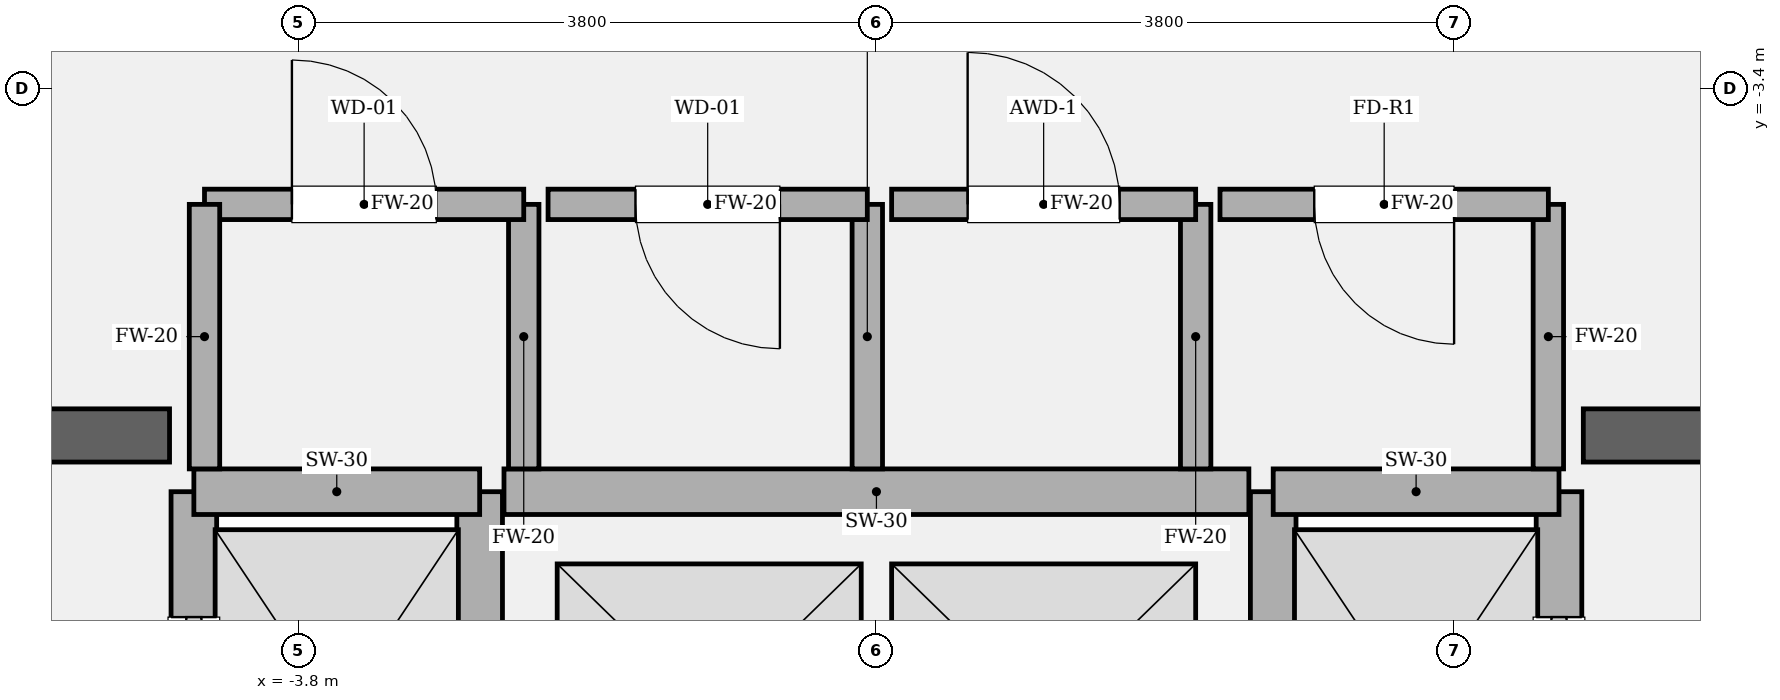
"""IFC4 building model, lengths in metres.
Left out: names, types, materials, properties, quantities, classifications, styles, units other than length and angle.
Written with IfcOpenShell. Run it as: python <this file> out.ifc"""

import sys

from ifc_helpers import new_model, si_unit, direction, frame, frame_2d, origin, place, context, subcontext, project, spatial, rectangle, extrude, element, fill, save


model = new_model("IFC4")
c1 = context("Model", 3, precision=1e-05, world=origin(), true_north=direction((0.0, 1.0)))
c2 = subcontext(c1, "Body", "Model", "MODEL_VIEW")
j1 = project(units=[si_unit("LENGTHUNIT", "METRE"), si_unit("PLANEANGLEUNIT", "RADIAN")], contexts=[c1])
p1 = place(None, origin())
s1 = spatial("IfcSite", under=j1, at=p1, CompositionType="ELEMENT")
p2 = place(p1, origin())
s2 = spatial("IfcBuilding", under=s1, at=p2, CompositionType="ELEMENT")
p3 = place(p2, frame((0.0, 0.0, -4.8)))
s3 = spatial("IfcBuildingStorey", under=s2, at=p3, CompositionType="ELEMENT", Elevation=-4.8)
p4 = place(p3, frame((-9.825, -5.68, 0.0), z_axis=(0.0, 0.0, 1.0), x_axis=(1.0, 0.0, 0.0)))
e1 = element("IfcWall", 1, at=p4, inside=s3, PredefinedType="SOLIDWALL", context=c2, shape_type="SweptSolid", body=[
    extrude(rectangle(XDim=5.175, YDim=0.35, at=frame_2d((2.587, 0.0))), origin(), (0.0, 0.0, 1.0), 4.8),
])
p5 = place(p4, frame((1.285, 0.0, 0.0)))
e2 = element("IfcOpeningElement", 2, at=p5, cuts=e1, PredefinedType="OPENING", context=c2, shape_type="SweptSolid", body=[
    extrude(rectangle(XDim=1.18, YDim=2.2, at=frame_2d((0.59, 1.1))), frame((0.0, 0.185, 0.0), z_axis=(0.0, -1.0, 0.0), x_axis=(1.0, 0.0, 0.0)), (0.0, 0.0, 1.0), 0.37),
])
p6 = place(p3, frame((4.65, -5.68, 0.0), z_axis=(0.0, 0.0, 1.0), x_axis=(1.0, 0.0, 0.0)))
e3 = element("IfcWall", 3, at=p6, inside=s3, PredefinedType="SOLIDWALL", context=c2, shape_type="SweptSolid", body=[
    extrude(rectangle(XDim=5.175, YDim=0.35, at=frame_2d((2.587, 0.0))), origin(), (0.0, 0.0, 1.0), 4.8),
])
p7 = place(p6, frame((2.71, 0.0, 0.0)))
e4 = element("IfcOpeningElement", 4, at=p7, cuts=e3, PredefinedType="OPENING", context=c2, shape_type="SweptSolid", body=[
    extrude(rectangle(XDim=1.18, YDim=2.2, at=frame_2d((0.59, 1.1))), frame((0.0, 0.185, 0.0), z_axis=(0.0, -1.0, 0.0), x_axis=(1.0, 0.0, 0.0)), (0.0, 0.0, 1.0), 0.37),
])
p8 = place(p3, frame((-4.49, -8.82, 0.0), z_axis=(0.0, 0.0, 1.0), x_axis=(0.0, 1.0, 0.0)))
e5 = element("IfcWall", 5, at=p8, inside=s3, PredefinedType="SOLIDWALL", context=c2, shape_type="SweptSolid", body=[
    extrude(rectangle(XDim=2.77, YDim=0.3, at=frame_2d((1.385, 0.0))), origin(), (0.0, 0.0, 1.0), 4.52),
])
p9 = place(p8, frame((0.825, 0.0, 0.0)))
e6 = element("IfcOpeningElement", 6, at=p9, cuts=e5, PredefinedType="OPENING", context=c2, shape_type="SweptSolid", body=[
    extrude(rectangle(XDim=1.12, YDim=2.25, at=frame_2d((0.56, 1.125))), frame((0.0, 0.16, 0.0), z_axis=(0.0, -1.0, 0.0), x_axis=(1.0, 0.0, 0.0)), (0.0, 0.0, 1.0), 0.32),
])
p10 = place(p3, frame((-2.61, -8.82, 0.0), z_axis=(0.0, 0.0, 1.0), x_axis=(0.0, 1.0, 0.0)))
e7 = element("IfcWall", 7, at=p10, inside=s3, PredefinedType="SOLIDWALL", context=c2, shape_type="SweptSolid", body=[
    extrude(rectangle(XDim=2.77, YDim=0.3, at=frame_2d((1.385, 0.0))), origin(), (0.0, 0.0, 1.0), 4.52),
])
p11 = place(p3, frame((-4.49, -6.05, 0.0), z_axis=(0.0, 0.0, 1.0), x_axis=(1.0, 0.0, 0.0)))
e8 = element("IfcWall", 8, at=p11, inside=s3, PredefinedType="SOLIDWALL", context=c2, shape_type="SweptSolid", body=[
    extrude(rectangle(XDim=1.88, YDim=0.3, at=frame_2d((0.94, 0.0))), origin(), (0.0, 0.0, 1.0), 4.52),
])
p12 = place(p3, frame((4.49, -8.82, 0.0), z_axis=(0.0, 0.0, 1.0), x_axis=(0.0, 1.0, 0.0)))
e9 = element("IfcWall", 9, at=p12, inside=s3, PredefinedType="SOLIDWALL", context=c2, shape_type="SweptSolid", body=[
    extrude(rectangle(XDim=2.77, YDim=0.3, at=frame_2d((1.385, 0.0))), origin(), (0.0, 0.0, 1.0), 4.52),
])
p13 = place(p12, frame((0.825, 0.0, 0.0)))
e10 = element("IfcOpeningElement", 10, at=p13, cuts=e9, PredefinedType="OPENING", context=c2, shape_type="SweptSolid", body=[
    extrude(rectangle(XDim=1.12, YDim=2.25, at=frame_2d((0.56, 1.125))), frame((0.0, 0.16, 0.0), z_axis=(0.0, -1.0, 0.0), x_axis=(1.0, 0.0, 0.0)), (0.0, 0.0, 1.0), 0.32),
])
p14 = place(p3, frame((2.61, -8.82, 0.0), z_axis=(0.0, 0.0, 1.0), x_axis=(0.0, 1.0, 0.0)))
e11 = element("IfcWall", 11, at=p14, inside=s3, PredefinedType="SOLIDWALL", context=c2, shape_type="SweptSolid", body=[
    extrude(rectangle(XDim=2.77, YDim=0.3, at=frame_2d((1.385, 0.0))), origin(), (0.0, 0.0, 1.0), 4.52),
])
p15 = place(p3, frame((2.61, -6.05, 0.0), z_axis=(0.0, 0.0, 1.0), x_axis=(1.0, 0.0, 0.0)))
e12 = element("IfcWall", 12, at=p15, inside=s3, PredefinedType="SOLIDWALL", context=c2, shape_type="SweptSolid", body=[
    extrude(rectangle(XDim=1.88, YDim=0.3, at=frame_2d((0.94, 0.0))), origin(), (0.0, 0.0, 1.0), 4.52),
])
p16 = place(p3, frame((-2.45, -6.05, 0.0), z_axis=(0.0, 0.0, 1.0), x_axis=(1.0, 0.0, 0.0)))
e13 = element("IfcWall", 13, at=p16, inside=s3, PredefinedType="SOLIDWALL", context=c2, shape_type="SweptSolid", body=[
    extrude(rectangle(XDim=4.9, YDim=0.3, at=frame_2d((2.45, 0.0))), origin(), (0.0, 0.0, 1.0), 4.52),
])
p17 = place(p3, frame((-2.32, -5.9, 0.0), z_axis=(0.0, 0.0, 1.0), x_axis=(0.0, 1.0, 0.0)))
e14 = element("IfcWall", 14, at=p17, inside=s3, PredefinedType="SOLIDWALL", context=c2, shape_type="SweptSolid", body=[
    extrude(rectangle(XDim=1.74, YDim=0.2, at=frame_2d((0.87, 0.0))), origin(), (0.0, 0.0, 1.0), 4.52),
])
p18 = place(p3, frame((-2.32, -4.16, 0.0), z_axis=(0.0, 0.0, 1.0), x_axis=(-1.0, 0.0, 0.0)))
e15 = element("IfcWall", 15, at=p18, inside=s3, PredefinedType="SOLIDWALL", context=c2, shape_type="SweptSolid", body=[
    extrude(rectangle(XDim=2.1, YDim=0.2, at=frame_2d((1.05, 0.0))), origin(), (0.0, 0.0, 1.0), 4.52),
])
p19 = place(p18, frame((0.575, 0.0, 0.0)))
e16 = element("IfcOpeningElement", 16, at=p19, cuts=e15, PredefinedType="OPENING", context=c2, shape_type="SweptSolid", body=[
    extrude(rectangle(XDim=0.95, YDim=2.15, at=frame_2d((0.475, 1.075))), frame((0.0, 0.11, 0.0), z_axis=(0.0, -1.0, 0.0), x_axis=(1.0, 0.0, 0.0)), (0.0, 0.0, 1.0), 0.22),
])
for number, where, z_axis, x_axis in (
    (17, (-4.42, -4.16, 0.0), (0.0, 0.0, 1.0), (0.0, -1.0, 0.0)),
    (18, (-0.06, -5.9, 0.0), (0.0, 0.0, 1.0), (0.0, 1.0, 0.0)),
):
    element("IfcWall", number, at=place(p3, frame(where, z_axis=z_axis, x_axis=x_axis)), inside=s3, PredefinedType="SOLIDWALL", context=c2, shape_type="SweptSolid", body=[
        extrude(rectangle(XDim=1.74, YDim=0.2, at=frame_2d((0.87, 0.0))), origin(), (0.0, 0.0, 1.0), 4.52),
    ])
p20 = place(p3, frame((-0.06, -4.16, 0.0), z_axis=(0.0, 0.0, 1.0), x_axis=(-1.0, 0.0, 0.0)))
e19 = element("IfcWall", 19, at=p20, inside=s3, PredefinedType="SOLIDWALL", context=c2, shape_type="SweptSolid", body=[
    extrude(rectangle(XDim=2.1, YDim=0.2, at=frame_2d((1.05, 0.0))), origin(), (0.0, 0.0, 1.0), 4.52),
])
p21 = place(p20, frame((0.575, 0.0, 0.0)))
e20 = element("IfcOpeningElement", 20, at=p21, cuts=e19, PredefinedType="OPENING", context=c2, shape_type="SweptSolid", body=[
    extrude(rectangle(XDim=0.95, YDim=2.15, at=frame_2d((0.475, 1.075))), frame((0.0, 0.11, 0.0), z_axis=(0.0, -1.0, 0.0), x_axis=(1.0, 0.0, 0.0)), (0.0, 0.0, 1.0), 0.22),
])
p22 = place(p3, frame((2.1, -5.9, 0.0), z_axis=(0.0, 0.0, 1.0), x_axis=(0.0, 1.0, 0.0)))
e21 = element("IfcWall", 21, at=p22, inside=s3, PredefinedType="SOLIDWALL", context=c2, shape_type="SweptSolid", body=[
    extrude(rectangle(XDim=1.74, YDim=0.2, at=frame_2d((0.87, 0.0))), origin(), (0.0, 0.0, 1.0), 4.52),
])
p23 = place(p3, frame((2.1, -4.16, 0.0), z_axis=(0.0, 0.0, 1.0), x_axis=(-1.0, 0.0, 0.0)))
e22 = element("IfcWall", 22, at=p23, inside=s3, PredefinedType="SOLIDWALL", context=c2, shape_type="SweptSolid", body=[
    extrude(rectangle(XDim=2.0, YDim=0.2, at=frame_2d((1.0, 0.0))), origin(), (0.0, 0.0, 1.0), 4.52),
])
p24 = place(p23, frame((0.5, 0.0, 0.0)))
e23 = element("IfcOpeningElement", 23, at=p24, cuts=e22, PredefinedType="OPENING", context=c2, shape_type="SweptSolid", body=[
    extrude(rectangle(XDim=1.0, YDim=2.15, at=frame_2d((0.5, 1.075))), frame((0.0, 0.11, 0.0), z_axis=(0.0, -1.0, 0.0), x_axis=(1.0, 0.0, 0.0)), (0.0, 0.0, 1.0), 0.22),
])
p25 = place(p3, frame((4.42, -5.9, 0.0), z_axis=(0.0, 0.0, 1.0), x_axis=(0.0, 1.0, 0.0)))
e24 = element("IfcWall", 24, at=p25, inside=s3, PredefinedType="SOLIDWALL", context=c2, shape_type="SweptSolid", body=[
    extrude(rectangle(XDim=1.74, YDim=0.2, at=frame_2d((0.87, 0.0))), origin(), (0.0, 0.0, 1.0), 4.52),
])
p26 = place(p3, frame((4.42, -4.16, 0.0), z_axis=(0.0, 0.0, 1.0), x_axis=(-1.0, 0.0, 0.0)))
e25 = element("IfcWall", 25, at=p26, inside=s3, PredefinedType="SOLIDWALL", context=c2, shape_type="SweptSolid", body=[
    extrude(rectangle(XDim=2.16, YDim=0.2, at=frame_2d((1.08, 0.0))), origin(), (0.0, 0.0, 1.0), 4.52),
])
p27 = place(p26, frame((0.62, 0.0, 0.0)))
e26 = element("IfcOpeningElement", 26, at=p27, cuts=e25, PredefinedType="OPENING", context=c2, shape_type="SweptSolid", body=[
    extrude(rectangle(XDim=0.92, YDim=2.1, at=frame_2d((0.46, 1.05))), frame((0.0, 0.11, 0.0), z_axis=(0.0, -1.0, 0.0), x_axis=(1.0, 0.0, 0.0)), (0.0, 0.0, 1.0), 0.22),
])
p28 = place(p9, origin())
e27 = element("IfcDoor", 27, at=p28, inside=s3, OperationType="SLIDING_TO_LEFT", PredefinedType="DOOR", context=c2, shape_type="SweptSolid", body=[
    extrude(rectangle(XDim=1.12, YDim=2.25, at=frame_2d((0.56, 1.125))), frame((0.0, 0.025, 0.0), z_axis=(0.0, -1.0, 0.0), x_axis=(1.0, 0.0, 0.0)), (0.0, 0.0, 1.0), 0.05),
])
fill(e6, e27)
p29 = place(p13, origin())
e28 = element("IfcDoor", 28, at=p29, inside=s3, OperationType="SLIDING_TO_RIGHT", PredefinedType="DOOR", context=c2, shape_type="SweptSolid", body=[
    extrude(rectangle(XDim=1.12, YDim=2.25, at=frame_2d((0.56, 1.125))), frame((0.0, 0.025, 0.0), z_axis=(0.0, -1.0, 0.0), x_axis=(1.0, 0.0, 0.0)), (0.0, 0.0, 1.0), 0.05),
])
fill(e10, e28)
p30 = place(p19, origin())
e29 = element("IfcDoor", 29, at=p30, inside=s3, OperationType="SINGLE_SWING_RIGHT", PredefinedType="DOOR", context=c2, shape_type="SweptSolid", body=[
    extrude(rectangle(XDim=0.95, YDim=2.15, at=frame_2d((0.475, 1.075))), frame((0.0, 0.025, 0.0), z_axis=(0.0, -1.0, 0.0), x_axis=(1.0, 0.0, 0.0)), (0.0, 0.0, 1.0), 0.05),
])
fill(e16, e29)
p31 = place(p21, origin())
e30 = element("IfcDoor", 30, at=p31, inside=s3, OperationType="SINGLE_SWING_LEFT", PredefinedType="DOOR", context=c2, shape_type="SweptSolid", body=[
    extrude(rectangle(XDim=0.95, YDim=2.15, at=frame_2d((0.475, 1.075))), frame((0.0, 0.025, 0.0), z_axis=(0.0, -1.0, 0.0), x_axis=(1.0, 0.0, 0.0)), (0.0, 0.0, 1.0), 0.05),
])
fill(e20, e30)
p32 = place(p24, origin())
e31 = element("IfcDoor", 31, at=p32, inside=s3, OperationType="SINGLE_SWING_RIGHT", PredefinedType="DOOR", context=c2, shape_type="SweptSolid", body=[
    extrude(rectangle(XDim=1.0, YDim=2.15, at=frame_2d((0.5, 1.075))), frame((0.0, 0.025, 0.0), z_axis=(0.0, -1.0, 0.0), x_axis=(1.0, 0.0, 0.0)), (0.0, 0.0, 1.0), 0.05),
])
fill(e23, e31)
p33 = place(p27, origin())
e32 = element("IfcDoor", 32, at=p33, inside=s3, OperationType="SINGLE_SWING_LEFT", PredefinedType="DOOR", context=c2, shape_type="SweptSolid", body=[
    extrude(rectangle(XDim=0.92, YDim=2.1, at=frame_2d((0.46, 1.05))), frame((0.0, 0.025, 0.0), z_axis=(0.0, -1.0, 0.0), x_axis=(1.0, 0.0, 0.0)), (0.0, 0.0, 1.0), 0.05),
])
fill(e26, e32)
save(model, sys.argv[1])
